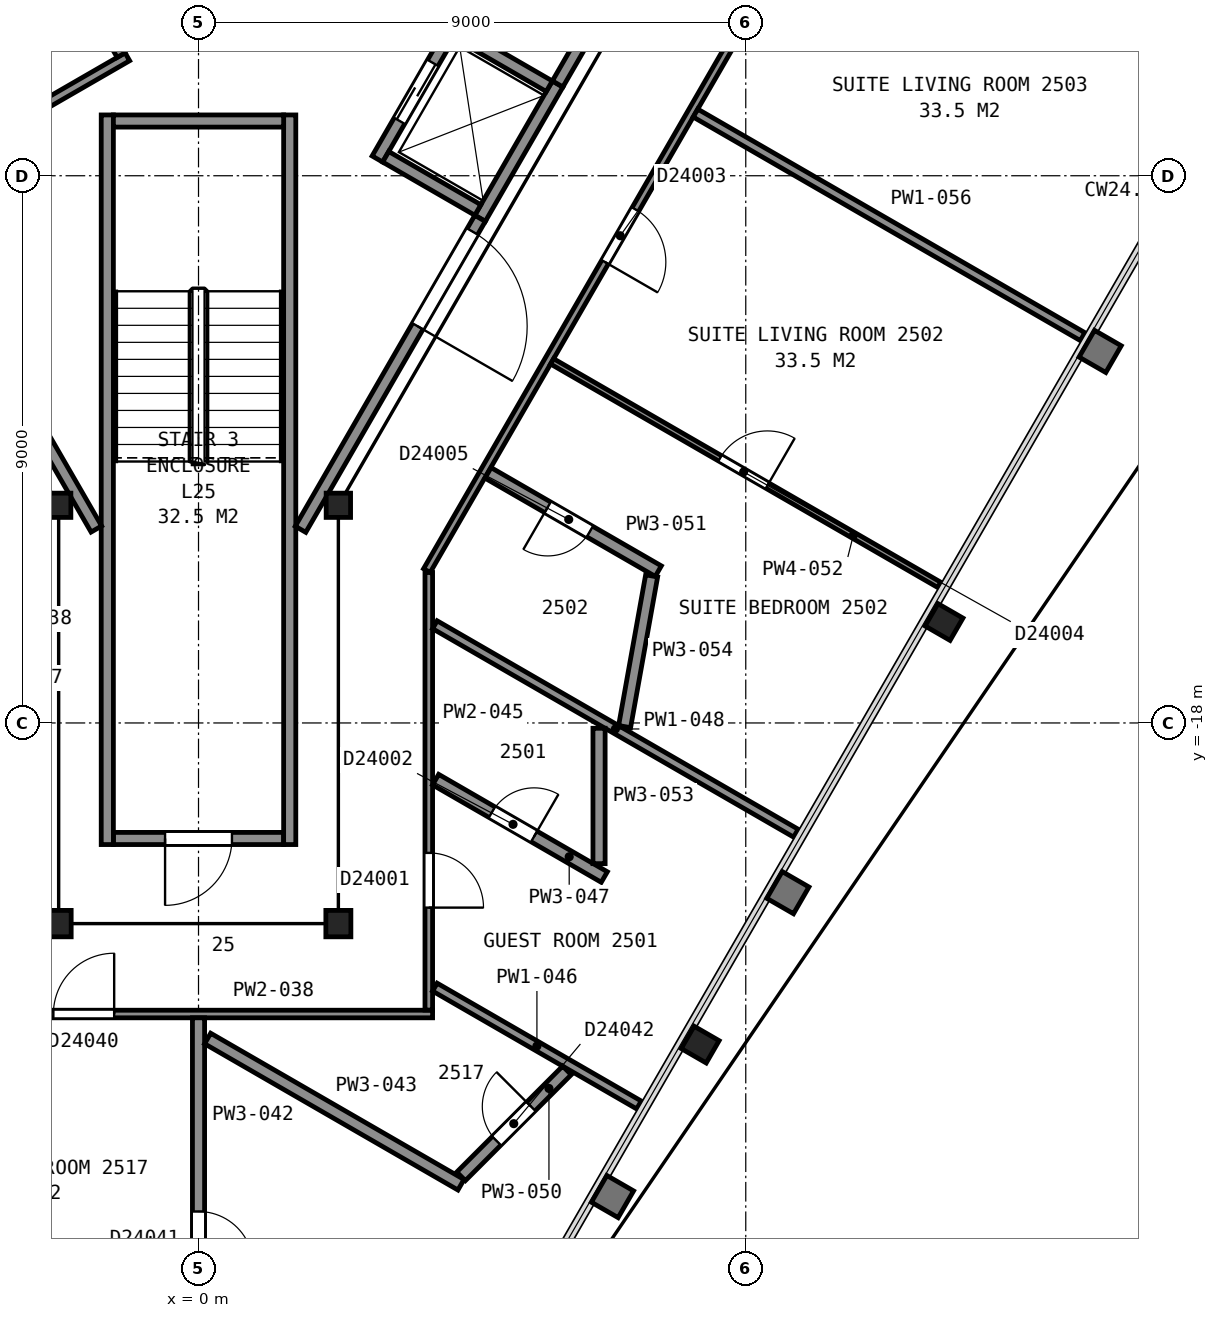
"""IFC4 building model, lengths in metres.
Left out: names, types, materials, properties, quantities, classifications, styles, units other than length and angle.
Written with IfcOpenShell. Run it as: python <this file> out.ifc"""

import sys

from ifc_helpers import new_model, si_unit, direction, frame, frame_2d, origin, origin_2d, place, context, subcontext, project, spatial, rectangle, i_section, extrude, element, fill, save


model = new_model("IFC4")
c1 = context("Model", 3, precision=1e-05, world=origin(), true_north=direction((0.0, 1.0)))
c2 = subcontext(c1, "Body", "Model", "MODEL_VIEW")
j1 = project(units=[si_unit("LENGTHUNIT", "METRE"), si_unit("PLANEANGLEUNIT", "RADIAN")], contexts=[c1])
p1 = place(None, origin())
s1 = spatial("IfcSite", under=j1, at=p1, CompositionType="ELEMENT")
p2 = place(p1, origin())
s2 = spatial("IfcBuilding", under=s1, at=p2, CompositionType="ELEMENT")
p3 = place(p2, frame((0.0, 0.0, 107.2)))
s3 = spatial("IfcBuildingStorey", under=s2, at=p3, CompositionType="ELEMENT", Elevation=107.2)
for number, where, z_axis, x_axis in (
    (1, (8.25, -23.29, 0.0), (0.0, 0.0, 1.0), (-0.5, -0.866, 0.0)),
    (2, (12.26, -16.34, 0.0), (0.0, 0.0, 1.0), (-0.5, -0.866, 0.0)),
):
    element("IfcColumn", number, at=place(p3, frame(where, z_axis=z_axis, x_axis=x_axis)), inside=s3, PredefinedType="COLUMN", context=c2, shape_type="SweptSolid", body=[
        extrude(i_section(OverallWidth=0.424, OverallDepth=0.475, WebThickness=0.048, FlangeThickness=0.077, FilletRadius=0.015, at=origin_2d()), origin(), (0.0, 0.0, 1.0), 3.6),
    ])
p4 = place(p3, frame((-2.3, -14.42, 0.0), z_axis=(0.0, 0.0, 1.0), x_axis=(1.0, 0.0, 0.0)))
e3 = element("IfcColumn", 3, at=p4, inside=s3, PredefinedType="COLUMN", context=c2, shape_type="SweptSolid", body=[
    extrude(i_section(OverallWidth=0.401, OverallDepth=0.399, WebThickness=0.025, FlangeThickness=0.04, FilletRadius=0.015, at=origin_2d()), origin(), (0.0, 0.0, 1.0), 3.6),
])
for number, where, z_axis, x_axis in (
    (4, (-2.3, -21.3, 0.0), (0.0, 0.0, 1.0), (-1.0, 0.0, 0.0)),
    (5, (2.3, -21.3, 0.0), (0.0, 0.0, 1.0), (-1.0, 0.0, 0.0)),
):
    element("IfcColumn", number, at=place(p3, frame(where, z_axis=z_axis, x_axis=x_axis)), inside=s3, PredefinedType="COLUMN", context=c2, shape_type="SweptSolid", body=[
        extrude(i_section(OverallWidth=0.411, OverallDepth=0.434, WebThickness=0.036, FlangeThickness=0.057, FilletRadius=0.015, at=origin_2d()), origin(), (0.0, 0.0, 1.0), 3.6),
    ])
p5 = place(p3, frame((2.3, -14.42, 0.0), z_axis=(0.0, 0.0, 1.0), x_axis=(1.0, 0.0, 0.0)))
e6 = element("IfcColumn", 6, at=p5, inside=s3, PredefinedType="COLUMN", context=c2, shape_type="SweptSolid", body=[
    extrude(i_section(OverallWidth=0.401, OverallDepth=0.399, WebThickness=0.025, FlangeThickness=0.04, FilletRadius=0.015, at=origin_2d()), origin(), (0.0, 0.0, 1.0), 3.6),
])
p6 = place(p3, frame((-1.4, -19.9, 0.0), z_axis=(0.0, 0.0, 1.0), x_axis=(1.0, 0.0, 0.0)))
e7 = element("IfcWall", 7, at=p6, inside=s3, PredefinedType="PARTITIONING", context=c2, shape_type="SweptSolid", body=[
    extrude(rectangle(XDim=2.8, YDim=0.2, at=frame_2d((1.4, 0.0))), origin(), (0.0, 0.0, 1.0), 3.35),
])
p7 = place(p6, frame((0.85, 0.0, 0.0)))
e8 = element("IfcOpeningElement", 8, at=p7, cuts=e7, PredefinedType="OPENING", context=c2, shape_type="SweptSolid", body=[
    extrude(rectangle(XDim=1.1, YDim=2.1, at=frame_2d((0.55, 1.05))), frame((0.0, 0.11, 0.0), z_axis=(0.0, -1.0, 0.0), x_axis=(1.0, 0.0, 0.0)), (0.0, 0.0, 1.0), 0.22),
])
for number, where, z_axis, x_axis in (
    (9, (1.5, -8.0, 0.0), (0.0, 0.0, 1.0), (0.0, -1.0, 0.0)),
    (10, (-1.5, -8.0, 0.0), (0.0, 0.0, 1.0), (0.0, -1.0, 0.0)),
):
    element("IfcWall", number, at=place(p3, frame(where, z_axis=z_axis, x_axis=x_axis)), inside=s3, PredefinedType="PARTITIONING", context=c2, shape_type="SweptSolid", body=[
        extrude(rectangle(XDim=12.0, YDim=0.2, at=frame_2d((6.0, 0.0))), origin(), (0.0, 0.0, 1.0), 3.35),
    ])
p8 = place(p3, frame((-1.4, -8.1, 0.0), z_axis=(0.0, 0.0, 1.0), x_axis=(1.0, 0.0, 0.0)))
e11 = element("IfcWall", 11, at=p8, inside=s3, PredefinedType="PARTITIONING", context=c2, shape_type="SweptSolid", body=[
    extrude(rectangle(XDim=2.8, YDim=0.2, at=frame_2d((1.4, 0.0))), origin(), (0.0, 0.0, 1.0), 3.35),
])
p9 = place(p3, frame((4.63, -9.7, 0.0), z_axis=(0.0, 0.0, 1.0), x_axis=(0.500062241894, 0.865989465428, 0.0)))
e12 = element("IfcWall", 12, at=p9, inside=s3, PredefinedType="PARTITIONING", context=c2, shape_type="SweptSolid", body=[
    extrude(rectangle(XDim=2.55, YDim=0.2, at=frame_2d((1.275, 0.0))), origin(), (0.0, 0.0, 1.0), 3.6),
])
p10 = place(p3, frame((2.942, -8.725, 0.0), z_axis=(0.0, 0.0, 1.0), x_axis=(0.500020783669, 0.866013403995, 0.0)))
e13 = element("IfcWall", 13, at=p10, inside=s3, PredefinedType="PARTITIONING", context=c2, shape_type="SweptSolid", body=[
    extrude(rectangle(XDim=2.55, YDim=0.2, at=frame_2d((1.275, 0.0))), origin(), (0.0, 0.0, 1.0), 3.6),
])
p11 = place(p10, frame((0.725, 0.0, 0.0)))
e14 = element("IfcOpeningElement", 14, at=p11, cuts=e13, PredefinedType="OPENING", context=c2, shape_type="SweptSolid", body=[
    extrude(rectangle(XDim=1.1, YDim=2.1, at=frame_2d((0.55, 1.05))), frame((0.0, 0.11, 0.0), z_axis=(0.0, -1.0, 0.0), x_axis=(1.0, 0.0, 0.0)), (0.0, 0.0, 1.0), 0.22),
])
p12 = place(p3, frame((5.769, -7.528, 0.0), z_axis=(0.0, 0.0, 1.0), x_axis=(-0.866002029911, 0.500040482552, 0.0)))
e15 = element("IfcWall", 15, at=p12, inside=s3, PredefinedType="PARTITIONING", context=c2, shape_type="SweptSolid", body=[
    extrude(rectangle(XDim=1.75, YDim=0.2, at=frame_2d((0.875, 0.0))), origin(), (0.0, 0.0, 1.0), 3.6),
])
p13 = place(p3, frame((4.594, -9.563, 0.0), z_axis=(0.0, 0.0, 1.0), x_axis=(-0.866036909293, 0.499980071345, 0.0)))
e16 = element("IfcWall", 16, at=p13, inside=s3, PredefinedType="PARTITIONING", context=c2, shape_type="SweptSolid", body=[
    extrude(rectangle(XDim=1.75, YDim=0.2, at=frame_2d((0.875, 0.0))), origin(), (0.0, 0.0, 1.0), 3.6),
])
p14 = place(p3, frame((-13.664, 5.946, 0.0), z_axis=(0.0, 0.0, 1.0), x_axis=(0.499994327219, -0.866028678941, 0.0)))
e17 = element("IfcWall", 17, at=p14, inside=s3, PredefinedType="PARTITIONING", context=c2, shape_type="SweptSolid", body=[
    extrude(rectangle(XDim=23.968, YDim=0.2, at=frame_2d((11.984, 0.0))), origin(), (0.0, 0.0, 1.0), 3.35),
])
p15 = place(p3, frame((-4.825, -9.154, 0.0), z_axis=(0.0, 0.0, 1.0), x_axis=(0.866023738697, 0.500002884005, 0.0)))
e18 = element("IfcWall", 18, at=p15, inside=s3, PredefinedType="PARTITIONING", context=c2, shape_type="SweptSolid", body=[
    extrude(rectangle(XDim=4.22, YDim=0.15, at=frame_2d((2.11, 0.0))), origin(), (0.0, 0.0, 1.0), 3.35),
])
p16 = place(p15, frame((1.595, 0.0, 0.0)))
e19 = element("IfcOpeningElement", 19, at=p16, cuts=e18, PredefinedType="OPENING", context=c2, shape_type="SweptSolid", body=[
    extrude(rectangle(XDim=0.9, YDim=2.1, at=frame_2d((0.45, 1.05))), frame((0.0, 0.085, 0.0), z_axis=(0.0, -1.0, 0.0), x_axis=(1.0, 0.0, 0.0)), (0.0, 0.0, 1.0), 0.17),
])
p17 = place(p3, frame((-2.472, -4.938, 0.0), z_axis=(0.0, 0.0, 1.0), x_axis=(0.500045362686, -0.865999212041, 0.0)))
e20 = element("IfcWall", 20, at=p17, inside=s3, PredefinedType="PARTITIONING", context=c2, shape_type="SweptSolid", body=[
    extrude(rectangle(XDim=2.4, YDim=0.15, at=frame_2d((1.2, 0.0))), origin(), (0.0, 0.0, 1.0), 3.35),
])
p18 = place(p3, frame((1.677, -14.815, 0.0), z_axis=(0.0, 0.0, 1.0), x_axis=(0.49999445743, 0.866028603765, 0.0)))
e21 = element("IfcWall", 21, at=p18, inside=s3, PredefinedType="PARTITIONING", context=c2, shape_type="SweptSolid", body=[
    extrude(rectangle(XDim=5.905, YDim=0.2, at=frame_2d((2.952, 0.0))), origin(), (0.0, 0.0, 1.0), 3.35),
])
p19 = place(p18, frame((3.855, 0.0, 0.0)))
e22 = element("IfcOpeningElement", 22, at=p19, cuts=e21, PredefinedType="OPENING", context=c2, shape_type="SweptSolid", body=[
    extrude(rectangle(XDim=1.8, YDim=2.1, at=frame_2d((0.9, 1.05))), frame((0.0, 0.11, 0.0), z_axis=(0.0, -1.0, 0.0), x_axis=(1.0, 0.0, 0.0)), (0.0, 0.0, 1.0), 0.22),
])
p20 = place(p3, frame((5.906, -7.49, 0.0), z_axis=(0.0, 0.0, 1.0), x_axis=(0.500252727967, 0.865879442048, 0.0)))
e23 = element("IfcWall", 23, at=p20, inside=s3, PredefinedType="PARTITIONING", context=c2, shape_type="SweptSolid", body=[
    extrude(rectangle(XDim=2.617, YDim=0.2, at=frame_2d((1.309, 0.0))), origin(), (0.0, 0.0, 1.0), 3.35),
])
p21 = place(p3, frame((3.85, -22.787, 0.0), z_axis=(0.0, 0.0, 1.0), x_axis=(-1.0, 0.0, 0.0)))
e24 = element("IfcWall", 24, at=p21, inside=s3, PredefinedType="PARTITIONING", context=c2, shape_type="SweptSolid", body=[
    extrude(rectangle(XDim=7.699, YDim=0.125, at=frame_2d((3.85, 0.0))), origin(), (0.0, 0.0, 1.0), 2.613),
])
p22 = place(p21, frame((5.237, 0.0, 0.0)))
e25 = element("IfcOpeningElement", 25, at=p22, cuts=e24, PredefinedType="OPENING", context=c2, shape_type="SweptSolid", body=[
    extrude(rectangle(XDim=1.0, YDim=2.1, at=frame_2d((0.5, 1.05))), frame((0.0, 0.073, 0.0), z_axis=(0.0, -1.0, 0.0), x_axis=(1.0, 0.0, 0.0)), (0.0, 0.0, 1.0), 0.145),
])
p23 = place(p3, frame((0.0, -22.85, 0.0), z_axis=(0.0, 0.0, 1.0), x_axis=(0.0, -1.0, 0.0)))
e26 = element("IfcWall", 26, at=p23, inside=s3, PredefinedType="PARTITIONING", context=c2, shape_type="SweptSolid", body=[
    extrude(rectangle(XDim=7.089, YDim=0.2, at=frame_2d((3.545, 0.0))), origin(), (0.0, 0.0, 1.0), 2.613),
])
p24 = place(p23, frame((3.186, 0.0, 0.0)))
e27 = element("IfcOpeningElement", 27, at=p24, cuts=e26, PredefinedType="OPENING", context=c2, shape_type="SweptSolid", body=[
    extrude(rectangle(XDim=0.9, YDim=2.1, at=frame_2d((0.45, 1.05))), frame((0.0, 0.11, 0.0), z_axis=(0.0, -1.0, 0.0), x_axis=(1.0, 0.0, 0.0)), (0.0, 0.0, 1.0), 0.22),
])
p25 = place(p3, frame((0.15, -23.19, 0.0), z_axis=(0.0, 0.0, 1.0), x_axis=(0.866061372545, -0.499937695103, 0.0)))
e28 = element("IfcWall", 28, at=p25, inside=s3, PredefinedType="PARTITIONING", context=c2, shape_type="SweptSolid", body=[
    extrude(rectangle(XDim=4.811, YDim=0.2, at=frame_2d((2.406, 0.0))), origin(), (0.0, 0.0, 1.0), 2.613),
])
p26 = place(p3, frame((3.787, -15.525, 0.0), z_axis=(0.0, 0.0, 1.0), x_axis=(0.0, -1.0, 0.0)))
e29 = element("IfcWall", 29, at=p26, inside=s3, PredefinedType="PARTITIONING", context=c2, shape_type="SweptSolid", body=[
    extrude(rectangle(XDim=7.197, YDim=0.125, at=frame_2d((3.599, 0.0))), origin(), (0.0, 0.0, 1.0), 2.613),
])
p27 = place(p26, frame((4.612, 0.0, 0.0)))
e30 = element("IfcOpeningElement", 30, at=p27, cuts=e29, PredefinedType="OPENING", context=c2, shape_type="SweptSolid", body=[
    extrude(rectangle(XDim=0.9, YDim=2.1, at=frame_2d((0.45, 1.05))), frame((0.0, 0.073, 0.0), z_axis=(0.0, -1.0, 0.0), x_axis=(1.0, 0.0, 0.0)), (0.0, 0.0, 1.0), 0.145),
])
p28 = place(p3, frame((3.887, -22.345, 0.0), z_axis=(0.0, 0.0, 1.0), x_axis=(0.865997824551, -0.500047765591, 0.0)))
e31 = element("IfcWall", 31, at=p28, inside=s3, PredefinedType="PARTITIONING", context=c2, shape_type="SweptSolid", body=[
    extrude(rectangle(XDim=3.876, YDim=0.15, at=frame_2d((1.938, 0.0))), origin(), (0.0, 0.0, 1.0), 2.613),
])
p29 = place(p3, frame((3.899, -18.932, 0.0), z_axis=(0.0, 0.0, 1.0), x_axis=(0.865973625928, -0.500089671156, 0.0)))
e32 = element("IfcWall", 32, at=p29, inside=s3, PredefinedType="PARTITIONING", context=c2, shape_type="SweptSolid", body=[
    extrude(rectangle(XDim=3.204, YDim=0.2, at=frame_2d((1.602, 0.0))), origin(), (0.0, 0.0, 1.0), 2.613),
])
p30 = place(p29, frame((1.07, 0.0, 0.0)))
e33 = element("IfcOpeningElement", 33, at=p30, cuts=e32, PredefinedType="OPENING", context=c2, shape_type="SweptSolid", body=[
    extrude(rectangle(XDim=0.8, YDim=2.1, at=frame_2d((0.4, 1.05))), frame((0.0, 0.11, 0.0), z_axis=(0.0, -1.0, 0.0), x_axis=(1.0, 0.0, 0.0)), (0.0, 0.0, 1.0), 0.22),
])
p31 = place(p3, frame((3.887, -16.385, 0.0), z_axis=(0.0, 0.0, 1.0), x_axis=(0.86602133163, -0.500007053112, 0.0)))
e34 = element("IfcWall", 34, at=p31, inside=s3, PredefinedType="PARTITIONING", context=c2, shape_type="SweptSolid", body=[
    extrude(rectangle(XDim=6.856, YDim=0.15, at=frame_2d((3.428, 0.0))), origin(), (0.0, 0.0, 1.0), 2.613),
])
p32 = place(p3, frame((15.684, 5.165, 0.0), z_axis=(0.0, 0.0, 1.0), x_axis=(-0.500027787016, -0.866009360349, 0.0)))
e35 = element("IfcWall", 35, at=p32, inside=s3, PredefinedType="PARTITIONING", context=c2, shape_type="SweptSolid", body=[
    extrude(rectangle(XDim=23.856, YDim=0.125, at=frame_2d((11.928, 0.0))), origin(), (0.0, 0.0, 1.0), 2.613),
])
p33 = place(p32, frame((16.996, 0.0, 0.0)))
e36 = element("IfcOpeningElement", 36, at=p33, cuts=e35, PredefinedType="OPENING", context=c2, shape_type="SweptSolid", body=[
    extrude(rectangle(XDim=1.0, YDim=2.1, at=frame_2d((0.5, 1.05))), frame((0.0, 0.073, 0.0), z_axis=(0.0, -1.0, 0.0), x_axis=(1.0, 0.0, 0.0)), (0.0, 0.0, 1.0), 0.145),
])
p34 = place(p32, frame((12.28, 0.0, 0.0)))
e37 = element("IfcOpeningElement", 37, at=p34, cuts=e35, PredefinedType="OPENING", context=c2, shape_type="SweptSolid", body=[
    extrude(rectangle(XDim=1.0, YDim=2.1, at=frame_2d((0.5, 1.05))), frame((0.0, 0.073, 0.0), z_axis=(0.0, -1.0, 0.0), x_axis=(1.0, 0.0, 0.0)), (0.0, 0.0, 1.0), 0.145),
])
p35 = place(p3, frame((4.318, -25.457, 0.0), z_axis=(0.0, 0.0, 1.0), x_axis=(0.70690846209, 0.707305044677, 0.0)))
e38 = element("IfcWall", 38, at=p35, inside=s3, PredefinedType="PARTITIONING", context=c2, shape_type="SweptSolid", body=[
    extrude(rectangle(XDim=2.462, YDim=0.2, at=frame_2d((1.231, 0.0))), origin(), (0.0, 0.0, 1.0), 2.613),
])
p36 = place(p35, frame((0.825, 0.0, 0.0)))
e39 = element("IfcOpeningElement", 39, at=p36, cuts=e38, PredefinedType="OPENING", context=c2, shape_type="SweptSolid", body=[
    extrude(rectangle(XDim=0.8, YDim=2.1, at=frame_2d((0.4, 1.05))), frame((0.0, 0.11, 0.0), z_axis=(0.0, -1.0, 0.0), x_axis=(1.0, 0.0, 0.0)), (0.0, 0.0, 1.0), 0.22),
])
p37 = place(p3, frame((7.562, -15.503, 0.0), z_axis=(0.0, 0.0, 1.0), x_axis=(-0.866078705744, 0.499907666931, 0.0)))
e40 = element("IfcWall", 40, at=p37, inside=s3, PredefinedType="PARTITIONING", context=c2, shape_type="SweptSolid", body=[
    extrude(rectangle(XDim=3.233, YDim=0.2, at=frame_2d((1.616, 0.0))), origin(), (0.0, 0.0, 1.0), 2.613),
])
p38 = place(p37, frame((1.301, 0.0, 0.0)))
e41 = element("IfcOpeningElement", 41, at=p38, cuts=e40, PredefinedType="OPENING", context=c2, shape_type="SweptSolid", body=[
    extrude(rectangle(XDim=0.8, YDim=2.1, at=frame_2d((0.4, 1.05))), frame((0.0, 0.11, 0.0), z_axis=(0.0, -1.0, 0.0), x_axis=(1.0, 0.0, 0.0)), (0.0, 0.0, 1.0), 0.22),
])
p39 = place(p3, frame((12.183, -15.729, 0.0), z_axis=(0.0, 0.0, 1.0), x_axis=(-0.866066702559, 0.499928461601, 0.0)))
e42 = element("IfcWall", 42, at=p39, inside=s3, PredefinedType="PARTITIONING", context=c2, shape_type="SweptSolid", body=[
    extrude(rectangle(XDim=7.352, YDim=0.1, at=frame_2d((3.676, 0.0))), origin(), (0.0, 0.0, 1.0), 2.613),
])
p40 = place(p39, frame((3.265, 0.0, 0.0)))
e43 = element("IfcOpeningElement", 43, at=p40, cuts=e42, PredefinedType="OPENING", context=c2, shape_type="SweptSolid", body=[
    extrude(rectangle(XDim=0.9, YDim=2.1, at=frame_2d((0.45, 1.05))), frame((0.0, 0.06, 0.0), z_axis=(0.0, -1.0, 0.0), x_axis=(1.0, 0.0, 0.0)), (0.0, 0.0, 1.0), 0.12),
])
p41 = place(p3, frame((6.587, -20.314, 0.0), z_axis=(0.0, 0.0, 1.0), x_axis=(0.0, 1.0, 0.0)))
e44 = element("IfcWall", 44, at=p41, inside=s3, PredefinedType="PARTITIONING", context=c2, shape_type="SweptSolid", body=[
    extrude(rectangle(XDim=2.227, YDim=0.2, at=frame_2d((1.113, 0.0))), origin(), (0.0, 0.0, 1.0), 2.613),
])
p42 = place(p3, frame((7.007, -18.06, 0.0), z_axis=(0.0, 0.0, 1.0), x_axis=(0.176615903702, 0.984279849717, 0.0)))
e45 = element("IfcWall", 45, at=p42, inside=s3, PredefinedType="PARTITIONING", context=c2, shape_type="SweptSolid", body=[
    extrude(rectangle(XDim=2.519, YDim=0.2, at=frame_2d((1.259, 0.0))), origin(), (0.0, 0.0, 1.0), 2.613),
])
p43 = place(p3, frame((8.173, -7.969, 0.0), z_axis=(0.0, 0.0, 1.0), x_axis=(0.86596990005, -0.500096122968, 0.0)))
e46 = element("IfcWall", 46, at=p43, inside=s3, PredefinedType="PARTITIONING", context=c2, shape_type="SweptSolid", body=[
    extrude(rectangle(XDim=7.352, YDim=0.15, at=frame_2d((3.676, 0.0))), origin(), (0.0, 0.0, 1.0), 2.613),
])
p44 = place(p3, frame((10.53, -3.886, 0.0), z_axis=(0.0, 0.0, 1.0), x_axis=(0.8660606245, -0.499938990969, 0.0)))
e47 = element("IfcWall", 47, at=p44, inside=s3, PredefinedType="PARTITIONING", context=c2, shape_type="SweptSolid", body=[
    extrude(rectangle(XDim=7.353, YDim=0.1, at=frame_2d((3.676, 0.0))), origin(), (0.0, 0.0, 1.0), 2.613),
])
p45 = place(p44, frame((3.188, 0.0, 0.0)))
e48 = element("IfcOpeningElement", 48, at=p45, cuts=e47, PredefinedType="OPENING", context=c2, shape_type="SweptSolid", body=[
    extrude(rectangle(XDim=0.9, YDim=2.1, at=frame_2d((0.45, 1.05))), frame((0.0, 0.06, 0.0), z_axis=(0.0, -1.0, 0.0), x_axis=(1.0, 0.0, 0.0)), (0.0, 0.0, 1.0), 0.12),
])
p46 = place(p7, origin())
e49 = element("IfcDoor", 49, at=p46, inside=s3, OperationType="SINGLE_SWING_LEFT", PredefinedType="DOOR", context=c2, shape_type="SweptSolid", body=[
    extrude(rectangle(XDim=1.1, YDim=2.1, at=frame_2d((0.55, 1.05))), frame((0.0, 0.025, 0.0), z_axis=(0.0, -1.0, 0.0), x_axis=(1.0, 0.0, 0.0)), (0.0, 0.0, 1.0), 0.05),
])
fill(e8, e49)
p47 = place(p11, origin())
e50 = element("IfcDoor", 50, at=p47, inside=s3, OperationType="SLIDING_TO_RIGHT", PredefinedType="DOOR", context=c2, shape_type="SweptSolid", body=[
    extrude(rectangle(XDim=1.1, YDim=2.1, at=frame_2d((0.55, 1.05))), frame((0.0, 0.025, 0.0), z_axis=(0.0, -1.0, 0.0), x_axis=(1.0, 0.0, 0.0)), (0.0, 0.0, 1.0), 0.05),
])
fill(e14, e50)
p48 = place(p19, origin())
e51 = element("IfcDoor", 51, at=p48, inside=s3, OperationType="DOUBLE_DOOR_SINGLE_SWING", PredefinedType="DOOR", context=c2, shape_type="SweptSolid", body=[
    extrude(rectangle(XDim=1.8, YDim=2.1, at=frame_2d((0.9, 1.05))), frame((0.0, 0.025, 0.0), z_axis=(0.0, -1.0, 0.0), x_axis=(1.0, 0.0, 0.0)), (0.0, 0.0, 1.0), 0.05),
])
fill(e22, e51)
p49 = place(p22, origin())
e52 = element("IfcDoor", 52, at=p49, inside=s3, OperationType="SINGLE_SWING_LEFT", PredefinedType="DOOR", context=c2, shape_type="SweptSolid", body=[
    extrude(rectangle(XDim=1.0, YDim=2.1, at=frame_2d((0.5, 1.05))), frame((0.0, 0.025, 0.0), z_axis=(0.0, -1.0, 0.0), x_axis=(1.0, 0.0, 0.0)), (0.0, 0.0, 1.0), 0.05),
])
fill(e25, e52)
p50 = place(p24, origin())
e53 = element("IfcDoor", 53, at=p50, inside=s3, OperationType="SINGLE_SWING_RIGHT", PredefinedType="DOOR", context=c2, shape_type="SweptSolid", body=[
    extrude(rectangle(XDim=0.9, YDim=2.1, at=frame_2d((0.45, 1.05))), frame((0.0, 0.025, 0.0), z_axis=(0.0, -1.0, 0.0), x_axis=(1.0, 0.0, 0.0)), (0.0, 0.0, 1.0), 0.05),
])
fill(e27, e53)
p51 = place(p27, origin())
e54 = element("IfcDoor", 54, at=p51, inside=s3, OperationType="SINGLE_SWING_RIGHT", PredefinedType="DOOR", context=c2, shape_type="SweptSolid", body=[
    extrude(rectangle(XDim=0.9, YDim=2.1, at=frame_2d((0.45, 1.05))), frame((0.0, 0.025, 0.0), z_axis=(0.0, -1.0, 0.0), x_axis=(1.0, 0.0, 0.0)), (0.0, 0.0, 1.0), 0.05),
])
fill(e30, e54)
p52 = place(p30, origin())
e55 = element("IfcDoor", 55, at=p52, inside=s3, OperationType="SINGLE_SWING_RIGHT", PredefinedType="DOOR", context=c2, shape_type="SweptSolid", body=[
    extrude(rectangle(XDim=0.8, YDim=2.1, at=frame_2d((0.4, 1.05))), frame((0.0, 0.025, 0.0), z_axis=(0.0, -1.0, 0.0), x_axis=(1.0, 0.0, 0.0)), (0.0, 0.0, 1.0), 0.05),
])
fill(e33, e55)
p53 = place(p33, origin())
e56 = element("IfcDoor", 56, at=p53, inside=s3, OperationType="SINGLE_SWING_RIGHT", PredefinedType="DOOR", context=c2, shape_type="SweptSolid", body=[
    extrude(rectangle(XDim=1.0, YDim=2.1, at=frame_2d((0.5, 1.05))), frame((0.0, 0.025, 0.0), z_axis=(0.0, -1.0, 0.0), x_axis=(1.0, 0.0, 0.0)), (0.0, 0.0, 1.0), 0.05),
])
fill(e36, e56)
p54 = place(p36, origin())
e57 = element("IfcDoor", 57, at=p54, inside=s3, OperationType="SINGLE_SWING_RIGHT", PredefinedType="DOOR", context=c2, shape_type="SweptSolid", body=[
    extrude(rectangle(XDim=0.8, YDim=2.1, at=frame_2d((0.4, 1.05))), frame((0.0, 0.025, 0.0), z_axis=(0.0, -1.0, 0.0), x_axis=(1.0, 0.0, 0.0)), (0.0, 0.0, 1.0), 0.05),
])
fill(e39, e57)
p55 = place(p38, origin())
e58 = element("IfcDoor", 58, at=p55, inside=s3, OperationType="SINGLE_SWING_RIGHT", PredefinedType="DOOR", context=c2, shape_type="SweptSolid", body=[
    extrude(rectangle(XDim=0.8, YDim=2.1, at=frame_2d((0.4, 1.05))), frame((0.0, 0.025, 0.0), z_axis=(0.0, -1.0, 0.0), x_axis=(1.0, 0.0, 0.0)), (0.0, 0.0, 1.0), 0.05),
])
fill(e41, e58)
p56 = place(p40, origin())
e59 = element("IfcDoor", 59, at=p56, inside=s3, OperationType="SINGLE_SWING_LEFT", PredefinedType="DOOR", context=c2, shape_type="SweptSolid", body=[
    extrude(rectangle(XDim=0.9, YDim=2.1, at=frame_2d((0.45, 1.05))), frame((0.0, 0.025, 0.0), z_axis=(0.0, -1.0, 0.0), x_axis=(1.0, 0.0, 0.0)), (0.0, 0.0, 1.0), 0.05),
])
fill(e43, e59)
save(model, sys.argv[1])
